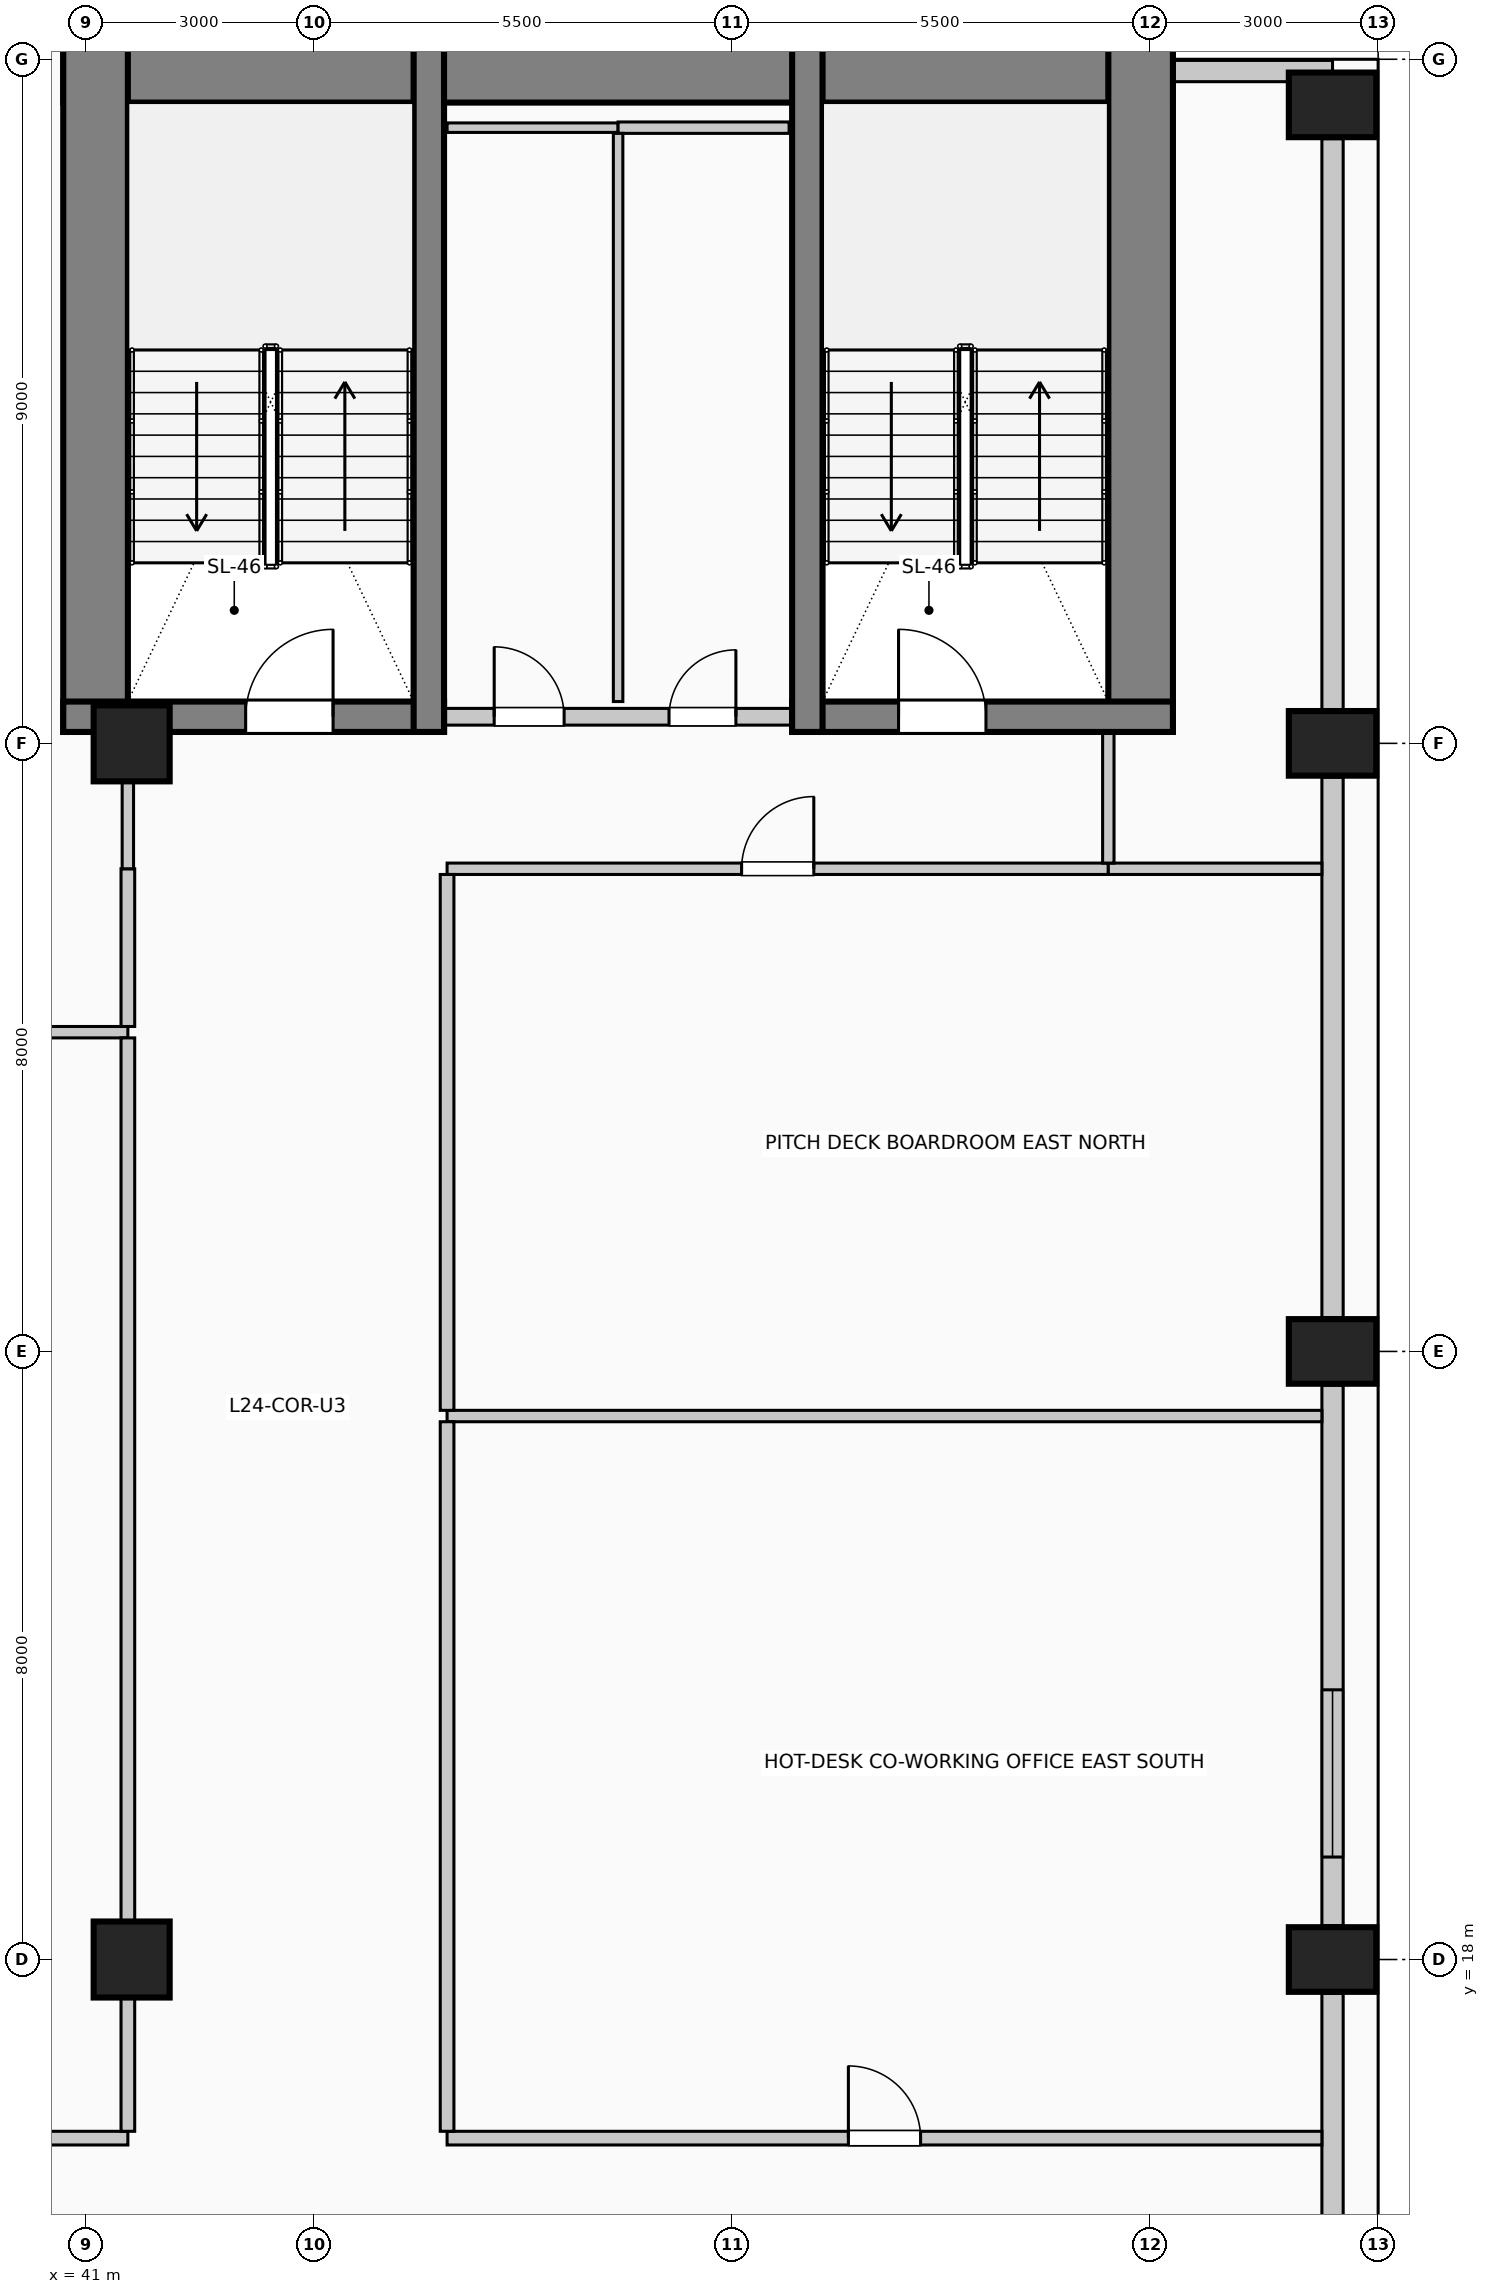
"""IFC4 building model, lengths in metres.
Left out: names, types, materials, properties, quantities, classifications, styles, units other than length and angle.
Written with IfcOpenShell. Run it as: python <this file> out.ifc"""

import sys

from ifc_helpers import new_model, si_unit, direction, frame, frame_2d, origin, origin_2d, place, context, subcontext, project, spatial, rectangle, circle, extrude, element, fill, save


model = new_model("IFC4")
c1 = context("Model", 3, precision=1e-05, world=origin(), true_north=direction((0.0, 1.0)))
c2 = subcontext(c1, "Body", "Model", "MODEL_VIEW")
j1 = project(units=[si_unit("LENGTHUNIT", "METRE"), si_unit("PLANEANGLEUNIT", "RADIAN")], contexts=[c1])
p1 = place(None, origin())
s1 = spatial("IfcSite", under=j1, at=p1, CompositionType="ELEMENT")
p2 = place(p1, origin())
s2 = spatial("IfcBuilding", under=s1, at=p2, CompositionType="ELEMENT")
p3 = place(p2, frame((0.0, 0.0, 100.6)))
s3 = spatial("IfcBuildingStorey", under=s2, at=p3, CompositionType="ELEMENT", Elevation=100.6)
p4 = place(p3, frame((40.7, 42.855, 0.0), z_axis=(0.0, 0.0, 1.0), x_axis=(1.0, 0.0, 0.0)))
e1 = element("IfcWall", 1, at=p4, inside=s3, PredefinedType="SHEAR", context=c2, shape_type="SweptSolid", body=[
    extrude(rectangle(XDim=14.6, YDim=0.85, at=frame_2d((7.3, 0.0))), origin(), (0.0, 0.0, 1.0), 4.0),
])
for number, where, z_axis, x_axis in (
    (2, (41.125, 34.15, 0.0), (0.0, 0.0, 1.0), (0.0, 1.0, 0.0)),
    (3, (54.875, 34.15, 0.0), (0.0, 0.0, 1.0), (0.0, 1.0, 0.0)),
):
    element("IfcWall", number, at=place(p3, frame(where, z_axis=z_axis, x_axis=x_axis)), inside=s3, PredefinedType="SHEAR", context=c2, shape_type="SweptSolid", body=[
        extrude(rectangle(XDim=9.13, YDim=0.85, at=frame_2d((4.565, 0.0))), origin(), (0.0, 0.0, 1.0), 4.0),
    ])
p5 = place(p3, frame((40.7, 34.35, 0.0), z_axis=(0.0, 0.0, 1.0), x_axis=(1.0, 0.0, 0.0)))
e4 = element("IfcWall", 4, at=p5, inside=s3, PredefinedType="SHEAR", context=c2, shape_type="SweptSolid", body=[
    extrude(rectangle(XDim=5.01, YDim=0.4, at=frame_2d((2.505, 0.0))), origin(), (0.0, 0.0, 1.0), 4.0),
])
p6 = place(p5, frame((2.4, 0.0, 0.0)))
e5 = element("IfcOpeningElement", 5, at=p6, cuts=e4, PredefinedType="OPENING", context=c2, shape_type="SweptSolid", body=[
    extrude(rectangle(XDim=1.15, YDim=2.2, at=frame_2d((0.575, 1.1))), frame((0.0, 0.21, 0.0), z_axis=(0.0, -1.0, 0.0), x_axis=(1.0, 0.0, 0.0)), (0.0, 0.0, 1.0), 0.42),
])
p7 = place(p3, frame((45.51, 34.15, 0.0), z_axis=(0.0, 0.0, 1.0), x_axis=(0.0, 1.0, 0.0)))
e6 = element("IfcWall", 6, at=p7, inside=s3, PredefinedType="SHEAR", context=c2, shape_type="SweptSolid", body=[
    extrude(rectangle(XDim=9.13, YDim=0.4, at=frame_2d((4.565, 0.0))), origin(), (0.0, 0.0, 1.0), 4.0),
])
p8 = place(p3, frame((50.29, 34.35, 0.0), z_axis=(0.0, 0.0, 1.0), x_axis=(1.0, 0.0, 0.0)))
e7 = element("IfcWall", 7, at=p8, inside=s3, PredefinedType="SHEAR", context=c2, shape_type="SweptSolid", body=[
    extrude(rectangle(XDim=5.01, YDim=0.4, at=frame_2d((2.505, 0.0))), origin(), (0.0, 0.0, 1.0), 4.0),
])
p9 = place(p8, frame((1.4, 0.0, 0.0)))
e8 = element("IfcOpeningElement", 8, at=p9, cuts=e7, PredefinedType="OPENING", context=c2, shape_type="SweptSolid", body=[
    extrude(rectangle(XDim=1.15, YDim=2.2, at=frame_2d((0.575, 1.1))), frame((0.0, 0.21, 0.0), z_axis=(0.0, -1.0, 0.0), x_axis=(1.0, 0.0, 0.0)), (0.0, 0.0, 1.0), 0.42),
])
p10 = place(p3, frame((50.49, 34.15, 0.0), z_axis=(0.0, 0.0, 1.0), x_axis=(0.0, 1.0, 0.0)))
e9 = element("IfcWall", 9, at=p10, inside=s3, PredefinedType="SHEAR", context=c2, shape_type="SweptSolid", body=[
    extrude(rectangle(XDim=9.13, YDim=0.4, at=frame_2d((4.565, 0.0))), origin(), (0.0, 0.0, 1.0), 4.0),
])
for number, where, z_axis, x_axis in (
    (10, (57.4, 18.0, 0.0), (0.0, 0.0, 1.0), (0.0, 1.0, 0.0)),
    (11, (57.4, 26.0, 0.0), (0.0, 0.0, 1.0), (0.0, 1.0, 0.0)),
    (12, (57.4, 34.0, 0.0), (0.0, 0.0, 1.0), (0.0, 1.0, 0.0)),
    (13, (57.4, 42.4, 0.0), (0.0, 0.0, 1.0), (0.0, 1.0, 0.0)),
):
    element("IfcColumn", number, at=place(p3, frame(where, z_axis=z_axis, x_axis=x_axis)), inside=s3, PredefinedType="COLUMN", context=c2, shape_type="SweptSolid", body=[
        extrude(rectangle(XDim=0.85, YDim=1.15, at=origin_2d()), origin(), (0.0, 0.0, 1.0), 4.0),
    ])
for number, where, z_axis, x_axis in (
    (14, (41.6, 18.0, 0.0), (0.0, 0.0, 1.0), (1.0, 0.0, 0.0)),
    (15, (41.6, 34.0, 0.0), (0.0, 0.0, 1.0), (1.0, 0.0, 0.0)),
):
    element("IfcColumn", number, at=place(p3, frame(where, z_axis=z_axis, x_axis=x_axis)), inside=s3, PredefinedType="COLUMN", context=c2, shape_type="SweptSolid", body=[
        extrude(circle(Radius=0.5, at=origin_2d()), origin(), (0.0, 0.0, 1.0), 4.0),
    ])
p11 = place(p3, frame((57.4, 17.555, 0.0), z_axis=(0.0, 0.0, 1.0), x_axis=(0.0, -1.0, 0.0)))
e16 = element("IfcWall", 16, at=p11, inside=s3, PredefinedType="SOLIDWALL", context=c2, shape_type="SweptSolid", body=[
    extrude(rectangle(XDim=7.11, YDim=0.28, at=frame_2d((3.555, 0.0))), origin(), (0.0, 0.0, 1.0), 2.875),
])
p12 = place(p3, frame((57.4, 25.555, 0.0), z_axis=(0.0, 0.0, 1.0), x_axis=(0.0, -1.0, 0.0)))
e17 = element("IfcWall", 17, at=p12, inside=s3, PredefinedType="SOLIDWALL", context=c2, shape_type="SweptSolid", body=[
    extrude(rectangle(XDim=7.11, YDim=0.28, at=frame_2d((3.555, 0.0))), origin(), (0.0, 0.0, 1.0), 2.875),
])
p13 = place(p12, frame((4.007, 0.0, 0.5)))
e18 = element("IfcOpeningElement", 18, at=p13, cuts=e17, PredefinedType="OPENING", context=c2, shape_type="SweptSolid", body=[
    extrude(rectangle(XDim=2.2, YDim=1.95, at=frame_2d((1.1, 0.975))), frame((0.0, 0.15, 0.0), z_axis=(0.0, -1.0, 0.0), x_axis=(1.0, 0.0, 0.0)), (0.0, 0.0, 1.0), 0.3),
])
p14 = place(p3, frame((57.4, 33.555, 0.0), z_axis=(0.0, 0.0, 1.0), x_axis=(0.0, -1.0, 0.0)))
e19 = element("IfcWall", 19, at=p14, inside=s3, PredefinedType="SOLIDWALL", context=c2, shape_type="SweptSolid", body=[
    extrude(rectangle(XDim=7.11, YDim=0.28, at=frame_2d((3.555, 0.0))), origin(), (0.0, 0.0, 1.0), 2.875),
])
p15 = place(p3, frame((57.4, 41.955, 0.0), z_axis=(0.0, 0.0, 1.0), x_axis=(0.0, -1.0, 0.0)))
e20 = element("IfcWall", 20, at=p15, inside=s3, PredefinedType="SOLIDWALL", context=c2, shape_type="SweptSolid", body=[
    extrude(rectangle(XDim=7.51, YDim=0.28, at=frame_2d((3.755, 0.0))), origin(), (0.0, 0.0, 1.0), 2.875),
])
p16 = place(p3, frame((55.305, 42.845, 0.0), z_axis=(0.0, 0.0, 1.0), x_axis=(1.0, 0.0, 0.0)))
e21 = element("IfcWall", 21, at=p16, inside=s3, PredefinedType="SOLIDWALL", context=c2, shape_type="SweptSolid", body=[
    extrude(rectangle(XDim=2.095, YDim=0.28, at=frame_2d((1.047, 0.0))), origin(), (0.0, 0.0, 1.0), 3.725),
])
p17 = place(p3, frame((45.72, 34.35, 0.0), z_axis=(0.0, 0.0, 1.0), x_axis=(1.0, 0.0, 0.0)))
e22 = element("IfcWall", 22, at=p17, inside=s3, PredefinedType="PARTITIONING", context=c2, shape_type="SweptSolid", body=[
    extrude(rectangle(XDim=4.56, YDim=0.22, at=frame_2d((2.28, 0.0))), origin(), (0.0, 0.0, 1.0), 3.725),
])
p18 = place(p17, frame((0.65, 0.0, 0.0)))
e23 = element("IfcOpeningElement", 23, at=p18, cuts=e22, PredefinedType="OPENING", context=c2, shape_type="SweptSolid", body=[
    extrude(rectangle(XDim=0.92, YDim=2.1, at=frame_2d((0.46, 1.05))), frame((0.0, 0.12, 0.0), z_axis=(0.0, -1.0, 0.0), x_axis=(1.0, 0.0, 0.0)), (0.0, 0.0, 1.0), 0.24),
])
p19 = place(p17, frame((2.95, 0.0, 0.0)))
e24 = element("IfcOpeningElement", 24, at=p19, cuts=e22, PredefinedType="OPENING", context=c2, shape_type="SweptSolid", body=[
    extrude(rectangle(XDim=0.88, YDim=2.1, at=frame_2d((0.44, 1.05))), frame((0.0, 0.12, 0.0), z_axis=(0.0, -1.0, 0.0), x_axis=(1.0, 0.0, 0.0)), (0.0, 0.0, 1.0), 0.24),
])
p20 = place(p3, frame((20.3, 15.65, 0.0), z_axis=(0.0, 0.0, 1.0), x_axis=(1.0, 0.0, 0.0)))
e25 = element("IfcWall", 25, at=p20, inside=s3, PredefinedType="PARTITIONING", context=c2, shape_type="SweptSolid", body=[
    extrude(rectangle(XDim=21.25, YDim=0.18, at=frame_2d((10.625, 0.0))), origin(), (0.0, 0.0, 1.0), 3.725),
])
p21 = place(p20, frame((10.1, 0.0, 0.0)))
e26 = element("IfcOpeningElement", 26, at=p21, cuts=e25, PredefinedType="OPENING", context=c2, shape_type="SweptSolid", body=[
    extrude(rectangle(XDim=1.05, YDim=2.15, at=frame_2d((0.525, 1.075))), frame((0.0, 0.1, 0.0), z_axis=(0.0, -1.0, 0.0), x_axis=(1.0, 0.0, 0.0)), (0.0, 0.0, 1.0), 0.2),
])
p22 = place(p3, frame((45.75, 15.65, 0.0), z_axis=(0.0, 0.0, 1.0), x_axis=(1.0, 0.0, 0.0)))
e27 = element("IfcWall", 27, at=p22, inside=s3, PredefinedType="PARTITIONING", context=c2, shape_type="SweptSolid", body=[
    extrude(rectangle(XDim=11.51, YDim=0.18, at=frame_2d((5.755, 0.0))), origin(), (0.0, 0.0, 1.0), 3.725),
])
p23 = place(p22, frame((5.28, 0.0, 0.0)))
e28 = element("IfcOpeningElement", 28, at=p23, cuts=e27, PredefinedType="OPENING", context=c2, shape_type="SweptSolid", body=[
    extrude(rectangle(XDim=0.95, YDim=2.15, at=frame_2d((0.475, 1.075))), frame((0.0, 0.1, 0.0), z_axis=(0.0, -1.0, 0.0), x_axis=(1.0, 0.0, 0.0)), (0.0, 0.0, 1.0), 0.2),
])
p24 = place(p3, frame((45.75, 25.15, 0.0), z_axis=(0.0, 0.0, 1.0), x_axis=(1.0, 0.0, 0.0)))
e29 = element("IfcWall", 29, at=p24, inside=s3, PredefinedType="PARTITIONING", context=c2, shape_type="SweptSolid", body=[
    extrude(rectangle(XDim=11.51, YDim=0.15, at=frame_2d((5.755, 0.0))), origin(), (0.0, 0.0, 1.0), 3.17),
])
p25 = place(p3, frame((20.3, 30.2, 0.0), z_axis=(0.0, 0.0, 1.0), x_axis=(1.0, 0.0, 0.0)))
e30 = element("IfcWall", 30, at=p25, inside=s3, PredefinedType="PARTITIONING", context=c2, shape_type="SweptSolid", body=[
    extrude(rectangle(XDim=21.25, YDim=0.15, at=frame_2d((10.625, 0.0))), origin(), (0.0, 0.0, 1.0), 3.725),
])
p26 = place(p3, frame((45.75, 32.35, 0.0), z_axis=(0.0, 0.0, 1.0), x_axis=(1.0, 0.0, 0.0)))
e31 = element("IfcWall", 31, at=p26, inside=s3, PredefinedType="PARTITIONING", context=c2, shape_type="SweptSolid", body=[
    extrude(rectangle(XDim=8.7, YDim=0.15, at=frame_2d((4.35, 0.0))), origin(), (0.0, 0.0, 1.0), 3.725),
])
p27 = place(p26, frame((3.875, 0.0, 0.0)))
e32 = element("IfcOpeningElement", 32, at=p27, cuts=e31, PredefinedType="OPENING", context=c2, shape_type="SweptSolid", body=[
    extrude(rectangle(XDim=0.95, YDim=2.15, at=frame_2d((0.475, 1.075))), frame((0.0, 0.085, 0.0), z_axis=(0.0, -1.0, 0.0), x_axis=(1.0, 0.0, 0.0)), (0.0, 0.0, 1.0), 0.17),
])
p28 = place(p3, frame((54.45, 32.35, 0.0), z_axis=(0.0, 0.0, 1.0), x_axis=(1.0, 0.0, 0.0)))
e33 = element("IfcWall", 33, at=p28, inside=s3, PredefinedType="PARTITIONING", context=c2, shape_type="SweptSolid", body=[
    extrude(rectangle(XDim=2.81, YDim=0.15, at=frame_2d((1.405, 0.0))), origin(), (0.0, 0.0, 1.0), 3.725),
])
p29 = place(p3, frame((45.75, 42.1, 0.0), z_axis=(0.0, 0.0, 1.0), x_axis=(1.0, 0.0, 0.0)))
e34 = element("IfcWall", 34, at=p29, inside=s3, PredefinedType="PARTITIONING", context=c2, shape_type="SweptSolid", body=[
    extrude(rectangle(XDim=2.25, YDim=0.125, at=frame_2d((1.125, 0.0))), origin(), (0.0, 0.0, 1.0), 3.725),
])
p30 = place(p3, frame((48.0, 42.1, 0.0), z_axis=(0.0, 0.0, 1.0), x_axis=(1.0, 0.0, 0.0)))
e35 = element("IfcWall", 35, at=p30, inside=s3, PredefinedType="PARTITIONING", context=c2, shape_type="SweptSolid", body=[
    extrude(rectangle(XDim=2.25, YDim=0.15, at=frame_2d((1.125, 0.0))), origin(), (0.0, 0.0, 1.0), 3.725),
])
p31 = place(p3, frame((41.55, 15.74, 0.0), z_axis=(0.0, 0.0, 1.0), x_axis=(0.0, 1.0, 0.0)))
e36 = element("IfcWall", 36, at=p31, inside=s3, PredefinedType="PARTITIONING", context=c2, shape_type="SweptSolid", body=[
    extrude(rectangle(XDim=1.76, YDim=0.18, at=frame_2d((0.88, 0.0))), origin(), (0.0, 0.0, 1.0), 3.07),
])
p32 = place(p3, frame((41.55, 18.5, 0.0), z_axis=(0.0, 0.0, 1.0), x_axis=(0.0, 1.0, 0.0)))
e37 = element("IfcWall", 37, at=p32, inside=s3, PredefinedType="PARTITIONING", context=c2, shape_type="SweptSolid", body=[
    extrude(rectangle(XDim=11.625, YDim=0.18, at=frame_2d((5.812, 0.0))), origin(), (0.0, 0.0, 1.0), 3.07),
])
p33 = place(p3, frame((41.55, 30.275, 0.0), z_axis=(0.0, 0.0, 1.0), x_axis=(0.0, 1.0, 0.0)))
e38 = element("IfcWall", 38, at=p33, inside=s3, PredefinedType="PARTITIONING", context=c2, shape_type="SweptSolid", body=[
    extrude(rectangle(XDim=2.075, YDim=0.18, at=frame_2d((1.038, 0.0))), origin(), (0.0, 0.0, 1.0), 3.07),
])
p34 = place(p3, frame((41.55, 32.35, 0.0), z_axis=(0.0, 0.0, 1.0), x_axis=(0.0, 1.0, 0.0)))
e39 = element("IfcWall", 39, at=p34, inside=s3, PredefinedType="PARTITIONING", context=c2, shape_type="SweptSolid", body=[
    extrude(rectangle(XDim=1.15, YDim=0.15, at=frame_2d((0.575, 0.0))), origin(), (0.0, 0.0, 1.0), 3.07),
])
p35 = place(p3, frame((45.75, 15.74, 0.0), z_axis=(0.0, 0.0, 1.0), x_axis=(0.0, 1.0, 0.0)))
e40 = element("IfcWall", 40, at=p35, inside=s3, PredefinedType="PARTITIONING", context=c2, shape_type="SweptSolid", body=[
    extrude(rectangle(XDim=9.335, YDim=0.18, at=frame_2d((4.667, 0.0))), origin(), (0.0, 0.0, 1.0), 3.725),
])
p36 = place(p3, frame((45.75, 25.225, 0.0), z_axis=(0.0, 0.0, 1.0), x_axis=(0.0, 1.0, 0.0)))
e41 = element("IfcWall", 41, at=p36, inside=s3, PredefinedType="PARTITIONING", context=c2, shape_type="SweptSolid", body=[
    extrude(rectangle(XDim=7.05, YDim=0.18, at=frame_2d((3.525, 0.0))), origin(), (0.0, 0.0, 1.0), 3.725),
])
p37 = place(p3, frame((48.0, 34.55, 0.0), z_axis=(0.0, 0.0, 1.0), x_axis=(0.0, 1.0, 0.0)))
e42 = element("IfcWall", 42, at=p37, inside=s3, PredefinedType="PARTITIONING", context=c2, shape_type="SweptSolid", body=[
    extrude(rectangle(XDim=7.475, YDim=0.125, at=frame_2d((3.737, 0.0))), origin(), (0.0, 0.0, 1.0), 3.725),
])
p38 = place(p3, frame((54.45, 32.425, 0.0), z_axis=(0.0, 0.0, 1.0), x_axis=(0.0, 1.0, 0.0)))
e43 = element("IfcWall", 43, at=p38, inside=s3, PredefinedType="PARTITIONING", context=c2, shape_type="SweptSolid", body=[
    extrude(rectangle(XDim=1.725, YDim=0.15, at=frame_2d((0.862, 0.0))), origin(), (0.0, 0.0, 1.0), 3.725),
])
p39 = place(p13, origin())
e44 = element("IfcWindow", 44, at=p39, inside=s3, PartitioningType="SINGLE_PANEL", PredefinedType="WINDOW", context=c2, shape_type="SweptSolid", body=[
    extrude(rectangle(XDim=2.2, YDim=1.95, at=frame_2d((1.1, 0.975))), frame((0.0, 0.03, 0.0), z_axis=(0.0, -1.0, 0.0), x_axis=(1.0, 0.0, 0.0)), (0.0, 0.0, 1.0), 0.06),
])
fill(e18, e44)
p40 = place(p6, origin())
e45 = element("IfcDoor", 45, at=p40, inside=s3, OperationType="SINGLE_SWING_RIGHT", PredefinedType="DOOR", context=c2, shape_type="SweptSolid", body=[
    extrude(rectangle(XDim=1.15, YDim=2.2, at=frame_2d((0.575, 1.1))), frame((0.0, 0.025, 0.0), z_axis=(0.0, -1.0, 0.0), x_axis=(1.0, 0.0, 0.0)), (0.0, 0.0, 1.0), 0.05),
])
fill(e5, e45)
p41 = place(p18, origin())
e46 = element("IfcDoor", 46, at=p41, inside=s3, OperationType="SINGLE_SWING_LEFT", PredefinedType="DOOR", context=c2, shape_type="SweptSolid", body=[
    extrude(rectangle(XDim=0.92, YDim=2.1, at=frame_2d((0.46, 1.05))), frame((0.0, 0.025, 0.0), z_axis=(0.0, -1.0, 0.0), x_axis=(1.0, 0.0, 0.0)), (0.0, 0.0, 1.0), 0.05),
])
fill(e23, e46)
p42 = place(p19, origin())
e47 = element("IfcDoor", 47, at=p42, inside=s3, OperationType="SINGLE_SWING_RIGHT", PredefinedType="DOOR", context=c2, shape_type="SweptSolid", body=[
    extrude(rectangle(XDim=0.88, YDim=2.1, at=frame_2d((0.44, 1.05))), frame((0.0, 0.025, 0.0), z_axis=(0.0, -1.0, 0.0), x_axis=(1.0, 0.0, 0.0)), (0.0, 0.0, 1.0), 0.05),
])
fill(e24, e47)
p43 = place(p9, origin())
e48 = element("IfcDoor", 48, at=p43, inside=s3, OperationType="SINGLE_SWING_LEFT", PredefinedType="DOOR", context=c2, shape_type="SweptSolid", body=[
    extrude(rectangle(XDim=1.15, YDim=2.2, at=frame_2d((0.575, 1.1))), frame((0.0, 0.025, 0.0), z_axis=(0.0, -1.0, 0.0), x_axis=(1.0, 0.0, 0.0)), (0.0, 0.0, 1.0), 0.05),
])
fill(e8, e48)
p44 = place(p23, origin())
e49 = element("IfcDoor", 49, at=p44, inside=s3, OperationType="SINGLE_SWING_LEFT", PredefinedType="DOOR", context=c2, shape_type="SweptSolid", body=[
    extrude(rectangle(XDim=0.95, YDim=2.15, at=frame_2d((0.475, 1.075))), frame((0.0, 0.025, 0.0), z_axis=(0.0, -1.0, 0.0), x_axis=(1.0, 0.0, 0.0)), (0.0, 0.0, 1.0), 0.05),
])
fill(e28, e49)
p45 = place(p27, origin())
e50 = element("IfcDoor", 50, at=p45, inside=s3, OperationType="SINGLE_SWING_RIGHT", PredefinedType="DOOR", context=c2, shape_type="SweptSolid", body=[
    extrude(rectangle(XDim=0.95, YDim=2.15, at=frame_2d((0.475, 1.075))), frame((0.0, 0.025, 0.0), z_axis=(0.0, -1.0, 0.0), x_axis=(1.0, 0.0, 0.0)), (0.0, 0.0, 1.0), 0.05),
])
fill(e32, e50)
save(model, sys.argv[1])
